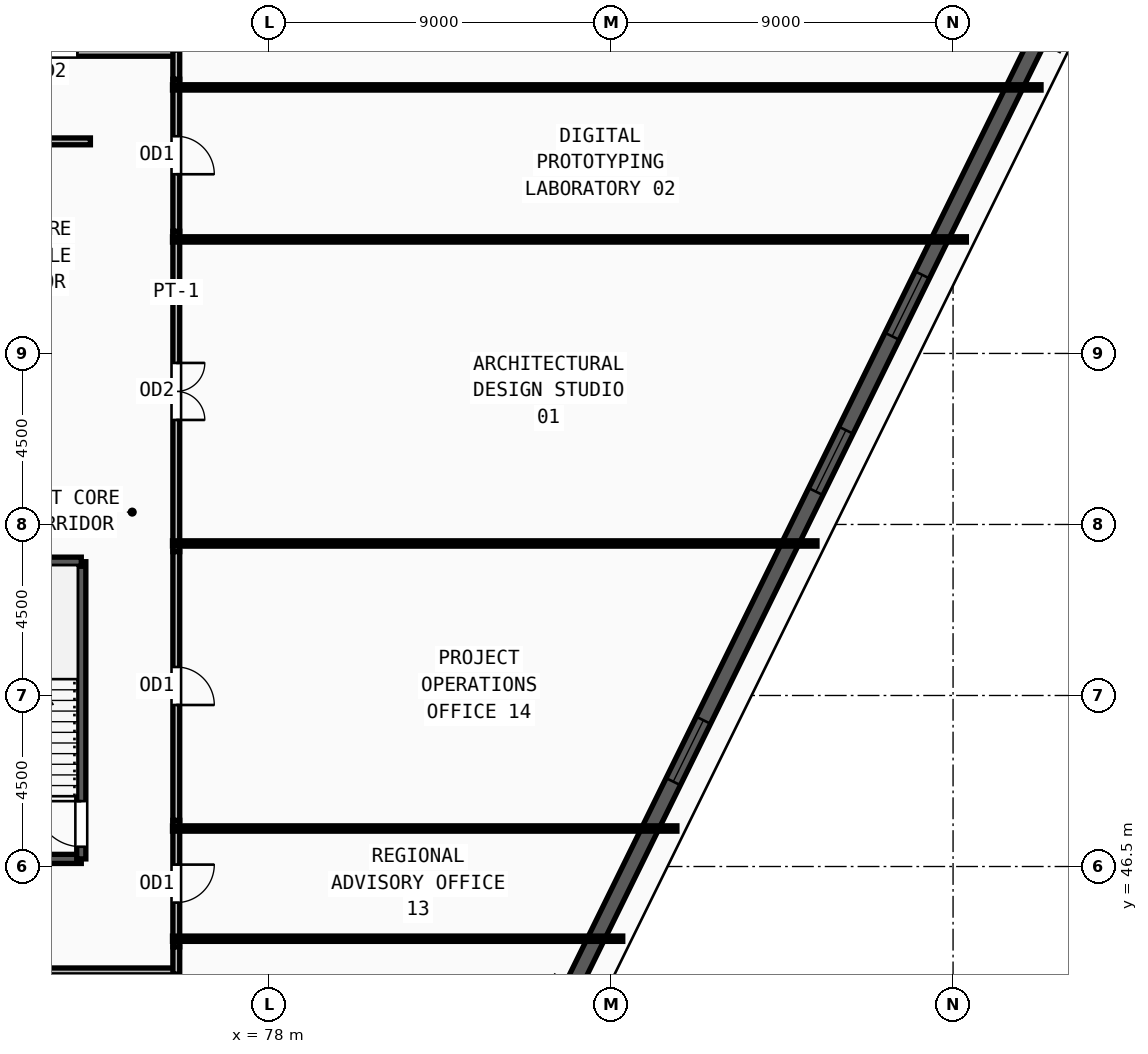
"""IFC4 building model, lengths in metres.
Left out: names, types, materials, properties, quantities, classifications, styles, units other than length and angle.
Written with IfcOpenShell. Run it as: python <this file> out.ifc"""

import sys

from ifc_helpers import new_model, si_unit, direction, frame, frame_2d, origin, place, context, subcontext, project, spatial, rectangle, extrude, source, transform, mapped, element, fill, save


model = new_model("IFC4")
c1 = context("Model", 3, precision=1e-05, world=origin(), true_north=direction((0.0, 1.0)))
c2 = subcontext(c1, "Body", "Model", "MODEL_VIEW")
j1 = project(units=[si_unit("LENGTHUNIT", "METRE"), si_unit("PLANEANGLEUNIT", "RADIAN")], contexts=[c1])
p1 = place(None, origin())
s1 = spatial("IfcSite", under=j1, at=p1, CompositionType="ELEMENT")
p2 = place(p1, origin())
s2 = spatial("IfcBuilding", under=s1, at=p2, CompositionType="ELEMENT")
p3 = place(p2, frame((0.0, 0.0, 51.75)))
s3 = spatial("IfcBuildingStorey", under=s2, at=p3, CompositionType="ELEMENT", Elevation=51.75)
p4 = place(p3, frame((85.967, 43.301, 0.0), z_axis=(0.0, 0.0, 1.0), x_axis=(0.441079786623, 0.897467894597, 0.0)))
e1 = element("IfcWall", 1, at=p4, inside=s3, PredefinedType="SOLIDWALL", context=c2, shape_type="SweptSolid", body=[
    extrude(rectangle(XDim=27.814, YDim=0.42, at=frame_2d((13.907, 0.0))), origin(), (0.0, 0.0, 1.0), 3.57),
])
m1 = source(origin(), c2, "Body", "SweptSolid", [
    extrude(rectangle(XDim=1.8, YDim=1.95, at=frame_2d((0.9, 0.975))), frame((0.0, 0.22, 0.0), z_axis=(0.0, -1.0, 0.0), x_axis=(1.0, 0.0, 0.0)), (0.0, 0.0, 1.0), 0.44),
])
p5 = place(p4, frame((6.053, 0.0, 0.55)))
e2 = element("IfcOpeningElement", 2, at=p5, cuts=e1, PredefinedType="OPENING", context=c2, shape_type="MappedRepresentation", body=[
    mapped(m1, transform((0.0, 0.0, 0.0), x_axis=(1.0, 0.0, 0.0), y_axis=(0.0, 1.0, 0.0), z_axis=(0.0, 0.0, 1.0), scale=1.0)),
])
p6 = place(p4, frame((14.557, 0.0, 0.55)))
e3 = element("IfcOpeningElement", 3, at=p6, cuts=e1, PredefinedType="OPENING", context=c2, shape_type="MappedRepresentation", body=[
    mapped(m1, transform((0.0, 0.0, 0.0), x_axis=(1.0, 0.0, 0.0), y_axis=(0.0, 1.0, 0.0), z_axis=(0.0, 0.0, 1.0), scale=1.0)),
])
p7 = place(p4, frame((19.11, 0.0, 0.55)))
e4 = element("IfcOpeningElement", 4, at=p7, cuts=e1, PredefinedType="OPENING", context=c2, shape_type="MappedRepresentation", body=[
    mapped(m1, transform((0.0, 0.0, 0.0), x_axis=(1.0, 0.0, 0.0), y_axis=(0.0, 1.0, 0.0), z_axis=(0.0, 0.0, 1.0), scale=1.0)),
])
p8 = place(p3, frame((69.62, 46.7, 0.0), z_axis=(0.0, 0.0, 1.0), x_axis=(1.0, 0.0, 0.0)))
e5 = element("IfcWall", 5, at=p8, inside=s3, PredefinedType="SOLIDWALL", context=c2, shape_type="SweptSolid", body=[
    extrude(rectangle(XDim=3.44, YDim=0.24, at=frame_2d((1.72, 0.0))), origin(), (0.0, 0.0, 1.0), 3.57),
])
p9 = place(p3, frame((73.06, 46.7, 0.0), z_axis=(0.0, 0.0, 1.0), x_axis=(0.0, 1.0, 0.0)))
e6 = element("IfcWall", 6, at=p9, inside=s3, PredefinedType="SOLIDWALL", context=c2, shape_type="SweptSolid", body=[
    extrude(rectangle(XDim=7.82, YDim=0.24, at=frame_2d((3.91, 0.0))), origin(), (0.0, 0.0, 1.0), 3.57),
])
m2 = source(origin(), c2, "Body", "SweptSolid", [
    extrude(rectangle(XDim=1.2, YDim=2.2, at=frame_2d((0.6, 1.1))), frame((0.0, 0.13, 0.0), z_axis=(0.0, -1.0, 0.0), x_axis=(1.0, 0.0, 0.0)), (0.0, 0.0, 1.0), 0.26),
])
p10 = place(p9, frame((0.32, 0.0, 0.0)))
e7 = element("IfcOpeningElement", 7, at=p10, cuts=e6, PredefinedType="OPENING", context=c2, shape_type="MappedRepresentation", body=[
    mapped(m2, transform((0.0, 0.0, 0.0), x_axis=(1.0, 0.0, 0.0), y_axis=(0.0, 1.0, 0.0), z_axis=(0.0, 0.0, 1.0), scale=1.0)),
])
p11 = place(p3, frame((73.06, 54.52, 0.0), z_axis=(0.0, 0.0, 1.0), x_axis=(-1.0, 0.0, 0.0)))
e8 = element("IfcWall", 8, at=p11, inside=s3, PredefinedType="SOLIDWALL", context=c2, shape_type="SweptSolid", body=[
    extrude(rectangle(XDim=3.44, YDim=0.24, at=frame_2d((1.72, 0.0))), origin(), (0.0, 0.0, 1.0), 3.57),
])
p12 = place(p3, frame((69.46, 65.58, 0.0), z_axis=(0.0, 0.0, 1.0), x_axis=(1.0, 0.0, 0.0)))
e9 = element("IfcWall", 9, at=p12, inside=s3, PredefinedType="PARTITIONING", context=c2, shape_type="SweptSolid", body=[
    extrude(rectangle(XDim=3.84, YDim=0.18, at=frame_2d((1.92, 0.0))), origin(), (0.0, 0.0, 1.0), 3.57),
])
m3 = source(origin(), c2, "Body", "SweptSolid", [
    extrude(rectangle(XDim=1.3, YDim=2.2, at=frame_2d((0.65, 1.1))), frame((0.0, 0.1, 0.0), z_axis=(0.0, -1.0, 0.0), x_axis=(1.0, 0.0, 0.0)), (0.0, 0.0, 1.0), 0.2),
])
p13 = place(p12, frame((1.27, 0.0, 0.0)))
e10 = element("IfcOpeningElement", 10, at=p13, cuts=e9, PredefinedType="OPENING", context=c2, shape_type="MappedRepresentation", body=[
    mapped(m3, transform((0.0, 0.0, 0.0), x_axis=(1.0, 0.0, 0.0), y_axis=(0.0, 1.0, 0.0), z_axis=(0.0, 0.0, 1.0), scale=1.0)),
])
p14 = place(p3, frame((75.56, 63.215, 0.0), z_axis=(0.0, 0.0, 1.0), x_axis=(0.0, -1.0, 0.0)))
e11 = element("IfcWall", 11, at=p14, inside=s3, PredefinedType="PARTITIONING", context=c2, shape_type="SweptSolid", body=[
    extrude(rectangle(XDim=8.43, YDim=0.18, at=frame_2d((4.215, 0.0))), origin(), (0.0, 0.0, 1.0), 3.57),
])
m4 = source(origin(), c2, "Body", "SweptSolid", [
    extrude(rectangle(XDim=1.5, YDim=2.2, at=frame_2d((0.75, 1.1))), frame((0.0, 0.1, 0.0), z_axis=(0.0, -1.0, 0.0), x_axis=(1.0, 0.0, 0.0)), (0.0, 0.0, 1.0), 0.2),
])
p15 = place(p14, frame((3.465, 0.0, 0.0)))
e12 = element("IfcOpeningElement", 12, at=p15, cuts=e11, PredefinedType="OPENING", context=c2, shape_type="MappedRepresentation", body=[
    mapped(m4, transform((0.0, 0.0, 0.0), x_axis=(1.0, 0.0, 0.0), y_axis=(0.0, 1.0, 0.0), z_axis=(0.0, 0.0, 1.0), scale=1.0)),
])
p16 = place(p3, frame((75.56, 67.215, 0.0), z_axis=(0.0, 0.0, 1.0), x_axis=(0.0, -1.0, 0.0)))
e13 = element("IfcWall", 13, at=p16, inside=s3, PredefinedType="PARTITIONING", context=c2, shape_type="SweptSolid", body=[
    extrude(rectangle(XDim=4.0, YDim=0.18, at=frame_2d((2.0, 0.0))), origin(), (0.0, 0.0, 1.0), 3.57),
])
m5 = source(origin(), c2, "Body", "SweptSolid", [
    extrude(rectangle(XDim=1.0, YDim=2.2, at=frame_2d((0.5, 1.1))), frame((0.0, 0.1, 0.0), z_axis=(0.0, -1.0, 0.0), x_axis=(1.0, 0.0, 0.0)), (0.0, 0.0, 1.0), 0.2),
])
p17 = place(p16, frame((1.5, 0.0, 0.0)))
e14 = element("IfcOpeningElement", 14, at=p17, cuts=e13, PredefinedType="OPENING", context=c2, shape_type="MappedRepresentation", body=[
    mapped(m5, transform((0.0, 0.0, 0.0), x_axis=(1.0, 0.0, 0.0), y_axis=(0.0, 1.0, 0.0), z_axis=(0.0, 0.0, 1.0), scale=1.0)),
])
p18 = place(p3, frame((68.785, 67.91, 0.0), z_axis=(0.0, 0.0, 1.0), x_axis=(1.0, 0.0, 0.0)))
e15 = element("IfcWall", 15, at=p18, inside=s3, PredefinedType="PARTITIONING", context=c2, shape_type="SweptSolid", body=[
    extrude(rectangle(XDim=6.845, YDim=0.18, at=frame_2d((3.422, 0.0))), origin(), (0.0, 0.0, 1.0), 3.57),
])
p19 = place(p18, frame((2.672, 0.0, 0.0)))
e16 = element("IfcOpeningElement", 16, at=p19, cuts=e15, PredefinedType="OPENING", context=c2, shape_type="MappedRepresentation", body=[
    mapped(m4, transform((0.0, 0.0, 0.0), x_axis=(1.0, 0.0, 0.0), y_axis=(0.0, 1.0, 0.0), z_axis=(0.0, 0.0, 1.0), scale=1.0)),
])
p20 = place(p3, frame((75.63, 43.74, 0.0), z_axis=(0.0, 0.0, 1.0), x_axis=(-1.0, 0.0, 0.0)))
e17 = element("IfcWall", 17, at=p20, inside=s3, PredefinedType="PARTITIONING", context=c2, shape_type="SweptSolid", body=[
    extrude(rectangle(XDim=9.915, YDim=0.18, at=frame_2d((4.958, 0.0))), origin(), (0.0, 0.0, 1.0), 3.57),
])
p21 = place(p20, frame((4.207, 0.0, 0.0)))
e18 = element("IfcOpeningElement", 18, at=p21, cuts=e17, PredefinedType="OPENING", context=c2, shape_type="MappedRepresentation", body=[
    mapped(m4, transform((0.0, 0.0, 0.0), x_axis=(1.0, 0.0, 0.0), y_axis=(0.0, 1.0, 0.0), z_axis=(0.0, 0.0, 1.0), scale=1.0)),
])
p22 = place(p3, frame((75.56, 47.715, 0.0), z_axis=(0.0, 0.0, 1.0), x_axis=(0.0, -1.0, 0.0)))
e19 = element("IfcWall", 19, at=p22, inside=s3, PredefinedType="PARTITIONING", context=c2, shape_type="SweptSolid", body=[
    extrude(rectangle(XDim=3.33, YDim=0.18, at=frame_2d((1.665, 0.0))), origin(), (0.0, 0.0, 1.0), 3.57),
])
p23 = place(p22, frame((1.165, 0.0, 0.0)))
e20 = element("IfcOpeningElement", 20, at=p23, cuts=e19, PredefinedType="OPENING", context=c2, shape_type="MappedRepresentation", body=[
    mapped(m5, transform((0.0, 0.0, 0.0), x_axis=(1.0, 0.0, 0.0), y_axis=(0.0, 1.0, 0.0), z_axis=(0.0, 0.0, 1.0), scale=1.0)),
])
p24 = place(p3, frame((75.56, 54.785, 0.0), z_axis=(0.0, 0.0, 1.0), x_axis=(0.0, -1.0, 0.0)))
e21 = element("IfcWall", 21, at=p24, inside=s3, PredefinedType="PARTITIONING", context=c2, shape_type="SweptSolid", body=[
    extrude(rectangle(XDim=7.07, YDim=0.18, at=frame_2d((3.535, 0.0))), origin(), (0.0, 0.0, 1.0), 3.57),
])
p25 = place(p24, frame((3.035, 0.0, 0.0)))
e22 = element("IfcOpeningElement", 22, at=p25, cuts=e21, PredefinedType="OPENING", context=c2, shape_type="MappedRepresentation", body=[
    mapped(m5, transform((0.0, 0.0, 0.0), x_axis=(1.0, 0.0, 0.0), y_axis=(0.0, 1.0, 0.0), z_axis=(0.0, 0.0, 1.0), scale=1.0)),
])
p26 = place(p3, frame((75.56, 67.98, 0.0), z_axis=(0.0, 0.0, 1.0), x_axis=(0.0, -1.0, 0.0)))
e23 = element("IfcWall", 23, at=p26, inside=s3, PredefinedType="PARTITIONING", context=c2, shape_type="SweptSolid", body=[
    extrude(rectangle(XDim=0.765, YDim=0.18, at=frame_2d((0.382, 0.0))), origin(), (0.0, 0.0, 1.0), 3.57),
])
p27 = place(p3, frame((75.56, 44.385, 0.0), z_axis=(0.0, 0.0, 1.0), x_axis=(0.0, -1.0, 0.0)))
e24 = element("IfcWall", 24, at=p27, inside=s3, PredefinedType="PARTITIONING", context=c2, shape_type="SweptSolid", body=[
    extrude(rectangle(XDim=0.715, YDim=0.18, at=frame_2d((0.357, 0.0))), origin(), (0.0, 0.0, 1.0), 3.57),
])
p28 = place(p3, frame((75.46, 44.6, 0.0), z_axis=(0.0, 0.0, 1.0), x_axis=(1.0, 0.0, 0.0)))
e25 = element("IfcWall", 25, at=p28, inside=s3, PredefinedType="PARTITIONING", context=c2, shape_type="SweptSolid", body=[
    extrude(rectangle(XDim=11.848, YDim=0.14, at=frame_2d((5.924, 0.0))), origin(), (0.0, 0.0, 1.0), 2.705),
])
p29 = place(p3, frame((75.46, 47.5, 0.0), z_axis=(0.0, 0.0, 1.0), x_axis=(1.0, 0.0, 0.0)))
e26 = element("IfcWall", 26, at=p29, inside=s3, PredefinedType="PARTITIONING", context=c2, shape_type="SweptSolid", body=[
    extrude(rectangle(XDim=13.273, YDim=0.14, at=frame_2d((6.636, 0.0))), origin(), (0.0, 0.0, 1.0), 3.57),
])
p30 = place(p3, frame((75.46, 55.0, 0.0), z_axis=(0.0, 0.0, 1.0), x_axis=(1.0, 0.0, 0.0)))
e27 = element("IfcWall", 27, at=p30, inside=s3, PredefinedType="PARTITIONING", context=c2, shape_type="SweptSolid", body=[
    extrude(rectangle(XDim=16.959, YDim=0.14, at=frame_2d((8.479, 0.0))), origin(), (0.0, 0.0, 1.0), 3.57),
])
p31 = place(p3, frame((75.46, 63.0, 0.0), z_axis=(0.0, 0.0, 1.0), x_axis=(1.0, 0.0, 0.0)))
e28 = element("IfcWall", 28, at=p31, inside=s3, PredefinedType="PARTITIONING", context=c2, shape_type="SweptSolid", body=[
    extrude(rectangle(XDim=20.89, YDim=0.14, at=frame_2d((10.445, 0.0))), origin(), (0.0, 0.0, 1.0), 3.57),
])
p32 = place(p3, frame((75.46, 67.0, 0.0), z_axis=(0.0, 0.0, 1.0), x_axis=(1.0, 0.0, 0.0)))
e29 = element("IfcWall", 29, at=p32, inside=s3, PredefinedType="PARTITIONING", context=c2, shape_type="SweptSolid", body=[
    extrude(rectangle(XDim=22.855, YDim=0.14, at=frame_2d((11.427, 0.0))), origin(), (0.0, 0.0, 1.0), 2.655),
])
m6 = source(origin(), c2, "Body", "SweptSolid", [
    extrude(rectangle(XDim=1.8, YDim=1.95, at=frame_2d((0.9, 0.975))), frame((0.0, 0.03, 0.0), z_axis=(0.0, -1.0, 0.0), x_axis=(1.0, 0.0, 0.0)), (0.0, 0.0, 1.0), 0.06),
])
p33 = place(p5, origin())
e30 = element("IfcWindow", 30, at=p33, inside=s3, PartitioningType="DOUBLE_PANEL_VERTICAL", PredefinedType="WINDOW", context=c2, shape_type="MappedRepresentation", body=[
    mapped(m6, transform((0.0, 0.0, 0.0), x_axis=(1.0, 0.0, 0.0), y_axis=(0.0, 1.0, 0.0), z_axis=(0.0, 0.0, 1.0), scale=1.0)),
])
fill(e2, e30)
p34 = place(p6, origin())
e31 = element("IfcWindow", 31, at=p34, inside=s3, PartitioningType="DOUBLE_PANEL_VERTICAL", PredefinedType="WINDOW", context=c2, shape_type="MappedRepresentation", body=[
    mapped(m6, transform((0.0, 0.0, 0.0), x_axis=(1.0, 0.0, 0.0), y_axis=(0.0, 1.0, 0.0), z_axis=(0.0, 0.0, 1.0), scale=1.0)),
])
fill(e3, e31)
p35 = place(p7, origin())
e32 = element("IfcWindow", 32, at=p35, inside=s3, PartitioningType="DOUBLE_PANEL_VERTICAL", PredefinedType="WINDOW", context=c2, shape_type="MappedRepresentation", body=[
    mapped(m6, transform((0.0, 0.0, 0.0), x_axis=(1.0, 0.0, 0.0), y_axis=(0.0, 1.0, 0.0), z_axis=(0.0, 0.0, 1.0), scale=1.0)),
])
fill(e4, e32)
m7 = source(origin(), c2, "Body", "SweptSolid", [
    extrude(rectangle(XDim=1.2, YDim=2.2, at=frame_2d((0.6, 1.1))), frame((0.0, 0.025, 0.0), z_axis=(0.0, -1.0, 0.0), x_axis=(1.0, 0.0, 0.0)), (0.0, 0.0, 1.0), 0.05),
])
p36 = place(p10, origin())
e33 = element("IfcDoor", 33, at=p36, inside=s3, OperationType="SINGLE_SWING_RIGHT", PredefinedType="DOOR", context=c2, shape_type="MappedRepresentation", body=[
    mapped(m7, transform((0.0, 0.0, 0.0), x_axis=(1.0, 0.0, 0.0), y_axis=(0.0, 1.0, 0.0), z_axis=(0.0, 0.0, 1.0), scale=1.0)),
])
fill(e7, e33)
m8 = source(origin(), c2, "Body", "SweptSolid", [
    extrude(rectangle(XDim=1.5, YDim=2.2, at=frame_2d((0.75, 1.1))), frame((0.0, 0.025, 0.0), z_axis=(0.0, -1.0, 0.0), x_axis=(1.0, 0.0, 0.0)), (0.0, 0.0, 1.0), 0.05),
])
p37 = place(p15, origin())
e34 = element("IfcDoor", 34, at=p37, inside=s3, OperationType="DOUBLE_DOOR_SINGLE_SWING", PredefinedType="DOOR", context=c2, shape_type="MappedRepresentation", body=[
    mapped(m8, transform((0.0, 0.0, 0.0), x_axis=(1.0, 0.0, 0.0), y_axis=(0.0, 1.0, 0.0), z_axis=(0.0, 0.0, 1.0), scale=1.0)),
])
fill(e12, e34)
m9 = source(origin(), c2, "Body", "SweptSolid", [
    extrude(rectangle(XDim=1.0, YDim=2.2, at=frame_2d((0.5, 1.1))), frame((0.0, 0.025, 0.0), z_axis=(0.0, -1.0, 0.0), x_axis=(1.0, 0.0, 0.0)), (0.0, 0.0, 1.0), 0.05),
])
p38 = place(p17, origin())
e35 = element("IfcDoor", 35, at=p38, inside=s3, OperationType="SINGLE_SWING_RIGHT", PredefinedType="DOOR", context=c2, shape_type="MappedRepresentation", body=[
    mapped(m9, transform((0.0, 0.0, 0.0), x_axis=(1.0, 0.0, 0.0), y_axis=(0.0, 1.0, 0.0), z_axis=(0.0, 0.0, 1.0), scale=1.0)),
])
fill(e14, e35)
p39 = place(p19, origin())
e36 = element("IfcDoor", 36, at=p39, inside=s3, OperationType="DOUBLE_DOOR_SINGLE_SWING", PredefinedType="DOOR", context=c2, shape_type="MappedRepresentation", body=[
    mapped(m8, transform((0.0, 0.0, 0.0), x_axis=(1.0, 0.0, 0.0), y_axis=(0.0, 1.0, 0.0), z_axis=(0.0, 0.0, 1.0), scale=1.0)),
])
fill(e16, e36)
p40 = place(p23, origin())
e37 = element("IfcDoor", 37, at=p40, inside=s3, OperationType="SINGLE_SWING_LEFT", PredefinedType="DOOR", context=c2, shape_type="MappedRepresentation", body=[
    mapped(m9, transform((0.0, 0.0, 0.0), x_axis=(1.0, 0.0, 0.0), y_axis=(0.0, 1.0, 0.0), z_axis=(0.0, 0.0, 1.0), scale=1.0)),
])
fill(e20, e37)
p41 = place(p25, origin())
e38 = element("IfcDoor", 38, at=p41, inside=s3, OperationType="SINGLE_SWING_RIGHT", PredefinedType="DOOR", context=c2, shape_type="MappedRepresentation", body=[
    mapped(m9, transform((0.0, 0.0, 0.0), x_axis=(1.0, 0.0, 0.0), y_axis=(0.0, 1.0, 0.0), z_axis=(0.0, 0.0, 1.0), scale=1.0)),
])
fill(e22, e38)
save(model, sys.argv[1])
